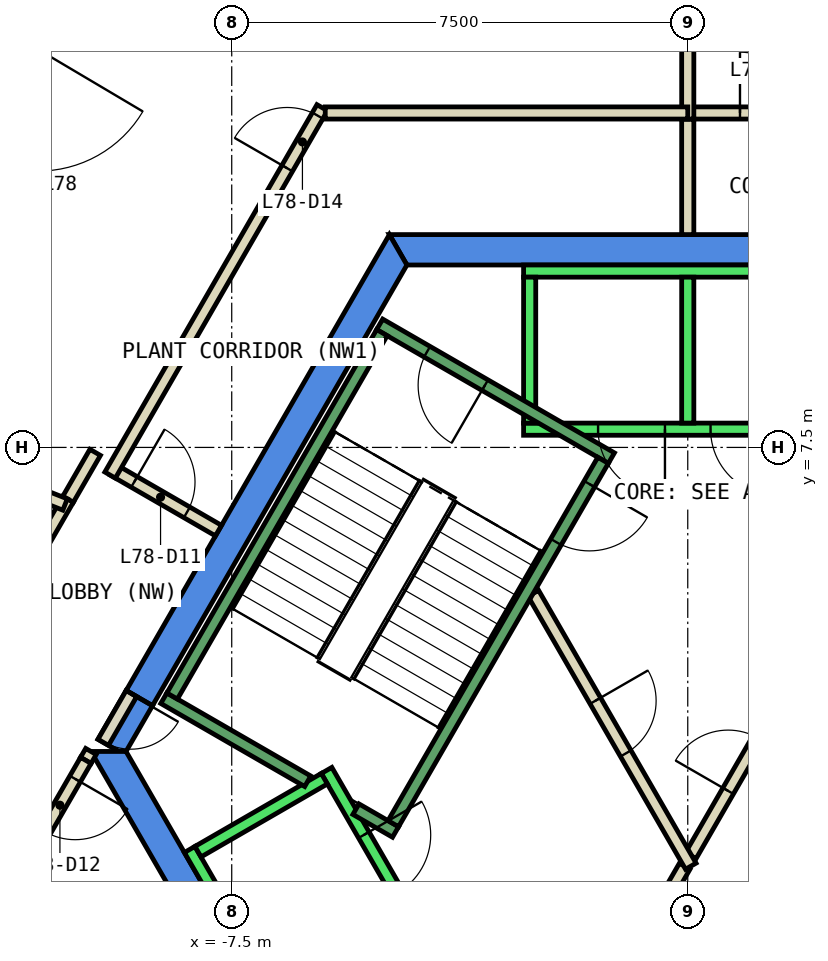
"""IFC4 building model, lengths in metres.
Left out: names, types, materials, properties, quantities, classifications, styles, units other than length and angle.
Written with IfcOpenShell. Run it as: python <this file> out.ifc"""

import sys

from ifc_helpers import new_model, si_unit, direction, frame, frame_2d, origin, place, context, subcontext, project, spatial, polyline, rectangle, outline, extrude, element, fill, save


model = new_model("IFC4")
c1 = context("Model", 3, precision=1e-05, world=origin(), true_north=direction((0.0, 1.0)))
c2 = subcontext(c1, "Body", "Model", "MODEL_VIEW")
j1 = project(units=[si_unit("LENGTHUNIT", "METRE"), si_unit("PLANEANGLEUNIT", "RADIAN")], contexts=[c1])
p1 = place(None, origin())
s1 = spatial("IfcSite", under=j1, at=p1, CompositionType="ELEMENT")
p2 = place(p1, origin())
s2 = spatial("IfcBuilding", under=s1, at=p2, CompositionType="ELEMENT")
p3 = place(p2, frame((0.0, 0.0, 331.4)))
s3 = spatial("IfcBuildingStorey", under=s2, at=p3, CompositionType="ELEMENT", Elevation=331.4)
p4 = place(p3, frame((0.0, 0.0, -0.45)))
e1 = element("IfcWall", 1, at=p4, inside=s3, PredefinedType="SHEAR", context=c2, shape_type="SweptSolid", body=[
    extrude(outline(polyline([(4.907, 11.0), (-4.907, 11.0), (-4.619, 10.5), (4.619, 10.5), (4.907, 11.0)])), origin(), (0.0, 0.0, 1.0), 4.6),
])
p5 = place(p3, frame((0.0, 0.0, -0.45)))
e2 = element("IfcWall", 2, at=p5, inside=s3, PredefinedType="SHEAR", context=c2, shape_type="SweptSolid", body=[
    extrude(outline(polyline([(-9.236, 3.502), (-8.803, 3.253), (-4.619, 10.5), (-4.907, 11.0), (-9.236, 3.502)])), origin(), (0.0, 0.0, 1.0), 4.6),
])
p6 = place(p3, frame((0.0, 0.0, 3.6)))
e3 = element("IfcWall", 3, at=p6, inside=s3, PredefinedType="SHEAR", context=c2, shape_type="SweptSolid", body=[
    extrude(outline(polyline([(-9.7, 2.7), (-9.354, 2.5), (-9.238, 2.5), (-8.803, 3.253), (-9.236, 3.502), (-9.7, 2.7)])), origin(), (0.0, 0.0, 1.0), 0.55),
])
p7 = place(p3, frame((0.0, 0.0, -0.45)))
e4 = element("IfcWall", 4, at=p7, inside=s3, PredefinedType="SHEAR", context=c2, shape_type="SweptSolid", body=[
    extrude(outline(polyline([(-9.815, 2.5), (-4.907, -6.0), (-4.619, -5.5), (-9.238, 2.5), (-9.815, 2.5)])), origin(), (0.0, 0.0, 1.0), 4.6),
])
p8 = place(p3, frame((-10.287, 14.711, 0.0), z_axis=(0.0, 0.0, 1.0), x_axis=(-0.509697735304, -0.86035354281, 0.0)))
e5 = element("IfcWall", 5, at=p8, inside=s3, PredefinedType="STANDARD", context=c2, shape_type="SweptSolid", body=[
    extrude(rectangle(XDim=7.098, YDim=0.3, at=frame_2d((3.549, 0.0))), origin(), (0.0, 0.0, 1.0), 4.15),
])
p9 = place(p8, frame((0.775, 0.0, 0.0)))
e6 = element("IfcOpeningElement", 6, at=p9, cuts=e5, PredefinedType="OPENING", context=c2, shape_type="SweptSolid", body=[
    extrude(rectangle(XDim=2.0, YDim=2.4, at=frame_2d((1.0, 1.2))), frame((0.0, 0.16, 0.0), z_axis=(0.0, -1.0, 0.0), x_axis=(1.0, 0.0, 0.0)), (0.0, 0.0, 1.0), 0.32),
])
p10 = place(p8, frame((4.124, 0.0, 0.9)))
e7 = element("IfcOpeningElement", 7, at=p10, cuts=e5, PredefinedType="OPENING", context=c2, shape_type="SweptSolid", body=[
    extrude(rectangle(XDim=2.4, YDim=3.0, at=frame_2d((1.2, 1.5))), frame((0.0, 0.16, 0.0), z_axis=(0.0, -1.0, 0.0), x_axis=(1.0, 0.0, 0.0)), (0.0, 0.0, 1.0), 0.32),
])
p11 = place(p3, frame((-0.982, -1.0, 0.0), z_axis=(0.0, 0.0, 1.0), x_axis=(0.50024047865, 0.865886518847, 0.0)))
e8 = element("IfcWall", 8, at=p11, inside=s3, PredefinedType="PARTITIONING", context=c2, shape_type="SweptSolid", body=[
    extrude(rectangle(XDim=1.863, YDim=0.2, at=frame_2d((0.931, 0.0))), origin(), (0.0, 0.0, 1.0), 4.15),
])
p12 = place(p3, frame((0.05, 0.787, 0.0), z_axis=(0.0, 0.0, 1.0), x_axis=(0.499954076797, 0.866051915934, 0.0)))
e9 = element("IfcWall", 9, at=p12, inside=s3, PredefinedType="PARTITIONING", context=c2, shape_type="SweptSolid", body=[
    extrude(rectangle(XDim=3.558, YDim=0.2, at=frame_2d((1.779, 0.0))), origin(), (0.0, 0.0, 1.0), 4.15),
])
p13 = place(p12, frame((1.229, 0.0, 0.0)))
e10 = element("IfcOpeningElement", 10, at=p13, cuts=e9, PredefinedType="OPENING", context=c2, shape_type="SweptSolid", body=[
    extrude(rectangle(XDim=1.0, YDim=2.1, at=frame_2d((0.5, 1.05))), frame((0.0, 0.11, 0.0), z_axis=(0.0, -1.0, 0.0), x_axis=(1.0, 0.0, 0.0)), (0.0, 0.0, 1.0), 0.22),
])
p14 = place(p3, frame((-2.54, 5.1, 0.0), z_axis=(0.0, 0.0, 1.0), x_axis=(0.499925051871, -0.866068670783, 0.0)))
e11 = element("IfcWall", 11, at=p14, inside=s3, PredefinedType="PARTITIONING", context=c2, shape_type="SweptSolid", body=[
    extrude(rectangle(XDim=5.181, YDim=0.2, at=frame_2d((2.59, 0.0))), origin(), (0.0, 0.0, 1.0), 4.15),
])
p15 = place(p14, frame((2.04, 0.0, 0.0)))
e12 = element("IfcOpeningElement", 12, at=p15, cuts=e11, PredefinedType="OPENING", context=c2, shape_type="SweptSolid", body=[
    extrude(rectangle(XDim=1.0, YDim=2.1, at=frame_2d((0.5, 1.05))), frame((0.0, 0.11, 0.0), z_axis=(0.0, -1.0, 0.0), x_axis=(1.0, 0.0, 0.0)), (0.0, 0.0, 1.0), 0.22),
])
p16 = place(p3, frame((0.0, 13.0, 0.0), z_axis=(0.0, 0.0, 1.0), x_axis=(1.0, 0.0, 0.0)))
e13 = element("IfcWall", 13, at=p16, inside=s3, PredefinedType="PARTITIONING", context=c2, shape_type="SweptSolid", body=[
    extrude(rectangle(XDim=2.838, YDim=0.2, at=frame_2d((1.419, 0.0))), origin(), (0.0, 0.0, 1.0), 4.15),
])
p17 = place(p16, frame((0.859, 0.0, 0.0)))
e14 = element("IfcOpeningElement", 14, at=p17, cuts=e13, PredefinedType="OPENING", context=c2, shape_type="SweptSolid", body=[
    extrude(rectangle(XDim=1.0, YDim=2.1, at=frame_2d((0.5, 1.05))), frame((0.0, 0.11, 0.0), z_axis=(0.0, -1.0, 0.0), x_axis=(1.0, 0.0, 0.0)), (0.0, 0.0, 1.0), 0.22),
])
p18 = place(p3, frame((0.0, 11.0, 0.0), z_axis=(0.0, 0.0, 1.0), x_axis=(0.0, 1.0, 0.0)))
e15 = element("IfcWall", 15, at=p18, inside=s3, PredefinedType="PARTITIONING", context=c2, shape_type="SweptSolid", body=[
    extrude(rectangle(XDim=1.9, YDim=0.2, at=frame_2d((0.95, 0.0))), origin(), (0.0, 0.0, 1.0), 4.15),
])
p19 = place(p3, frame((0.0, 12.9, 0.0), z_axis=(0.0, 0.0, 1.0), x_axis=(0.0, 1.0, 0.0)))
e16 = element("IfcWall", 16, at=p19, inside=s3, PredefinedType="PARTITIONING", context=c2, shape_type="SweptSolid", body=[
    extrude(rectangle(XDim=10.092, YDim=0.2, at=frame_2d((5.046, 0.0))), origin(), (0.0, 0.0, 1.0), 4.15),
])
p20 = place(p3, frame((-9.45, 7.132, 0.0), z_axis=(0.0, 0.0, 1.0), x_axis=(0.866010750942, -0.50002537861, 0.0)))
e17 = element("IfcWall", 17, at=p20, inside=s3, PredefinedType="PARTITIONING", context=c2, shape_type="SweptSolid", body=[
    extrude(rectangle(XDim=2.0, YDim=0.2, at=frame_2d((1.0, 0.0))), origin(), (0.0, 0.0, 1.0), 4.15),
])
p21 = place(p20, frame((0.4, 0.0, 0.0)))
e18 = element("IfcOpeningElement", 18, at=p21, cuts=e17, PredefinedType="OPENING", context=c2, shape_type="SweptSolid", body=[
    extrude(rectangle(XDim=1.0, YDim=2.1, at=frame_2d((0.5, 1.05))), frame((0.0, 0.11, 0.0), z_axis=(0.0, -1.0, 0.0), x_axis=(1.0, 0.0, 0.0)), (0.0, 0.0, 1.0), 0.22),
])
p22 = place(p3, frame((-9.815, 2.5, 0.0), z_axis=(0.0, 0.0, 1.0), x_axis=(-0.5004692653, -0.865754303766, 0.0)))
e19 = element("IfcWall", 19, at=p22, inside=s3, PredefinedType="PARTITIONING", context=c2, shape_type="SweptSolid", body=[
    extrude(rectangle(XDim=0.17, YDim=0.2, at=frame_2d((0.085, 0.0))), origin(), (0.0, 0.0, 1.0), 2.4),
])
p23 = place(p3, frame((-13.346, 1.183, 0.0), z_axis=(0.0, 0.0, 1.0), x_axis=(0.49998814853, 0.866032246126, 0.0)))
e20 = element("IfcWall", 20, at=p23, inside=s3, PredefinedType="PARTITIONING", context=c2, shape_type="SweptSolid", body=[
    extrude(rectangle(XDim=6.31, YDim=0.2, at=frame_2d((3.155, 0.0))), origin(), (0.0, 0.0, 1.0), 4.15),
])
p24 = place(p23, frame((2.68, 0.0, 0.0)))
e21 = element("IfcOpeningElement", 21, at=p24, cuts=e20, PredefinedType="OPENING", context=c2, shape_type="SweptSolid", body=[
    extrude(rectangle(XDim=1.0, YDim=2.1, at=frame_2d((0.5, 1.05))), frame((0.0, 0.11, 0.0), z_axis=(0.0, -1.0, 0.0), x_axis=(1.0, 0.0, 0.0)), (0.0, 0.0, 1.0), 0.22),
])
p25 = place(p3, frame((-10.191, 6.648, 0.0), z_axis=(0.0, 0.0, 1.0), x_axis=(0.49973828311, 0.866176453382, 0.0)))
e22 = element("IfcWall", 22, at=p25, inside=s3, PredefinedType="PARTITIONING", context=c2, shape_type="SweptSolid", body=[
    extrude(rectangle(XDim=0.89, YDim=0.2, at=frame_2d((0.445, 0.0))), origin(), (0.0, 0.0, 1.0), 4.15),
])
p26 = place(p3, frame((-9.5, 7.045, 0.0), z_axis=(0.0, 0.0, 1.0), x_axis=(0.499966812698, 0.866044563634, 0.0)))
e23 = element("IfcWall", 23, at=p26, inside=s3, PredefinedType="PARTITIONING", context=c2, shape_type="SweptSolid", body=[
    extrude(rectangle(XDim=6.977, YDim=0.2, at=frame_2d((3.488, 0.0))), origin(), (0.0, 0.0, 1.0), 4.15),
])
p27 = place(p26, frame((5.826, 0.0, 0.0)))
e24 = element("IfcOpeningElement", 24, at=p27, cuts=e23, PredefinedType="OPENING", context=c2, shape_type="SweptSolid", body=[
    extrude(rectangle(XDim=1.0, YDim=2.1, at=frame_2d((0.5, 1.05))), frame((0.0, 0.11, 0.0), z_axis=(0.0, -1.0, 0.0), x_axis=(1.0, 0.0, 0.0)), (0.0, 0.0, 1.0), 0.22),
])
p28 = place(p3, frame((-5.962, 13.0, 0.0), z_axis=(0.0, 0.0, 1.0), x_axis=(1.0, 0.0, 0.0)))
e25 = element("IfcWall", 25, at=p28, inside=s3, PredefinedType="PARTITIONING", context=c2, shape_type="SweptSolid", body=[
    extrude(rectangle(XDim=5.962, YDim=0.2, at=frame_2d((2.981, 0.0))), origin(), (0.0, 0.0, 1.0), 4.15),
])
p29 = place(p3, frame((-13.135, 7.709, 0.0), z_axis=(0.0, 0.0, 1.0), x_axis=(0.929543616209, -0.368712171707, 0.0)))
e26 = element("IfcWall", 26, at=p29, inside=s3, PredefinedType="PARTITIONING", context=c2, shape_type="SweptSolid", body=[
    extrude(rectangle(XDim=3.113, YDim=0.2, at=frame_2d((1.557, 0.0))), origin(), (0.0, 0.0, 1.0), 4.15),
])
p30 = place(p3, frame((-9.15, 3.452, 0.0), z_axis=(0.0, 0.0, 1.0), x_axis=(-0.500079945886, -0.865979242085, 0.0)))
e27 = element("IfcWall", 27, at=p30, inside=s3, PredefinedType="PARTITIONING", context=c2, shape_type="SweptSolid", body=[
    extrude(rectangle(XDim=0.926, YDim=0.2, at=frame_2d((0.463, 0.0))), origin(), (0.0, 0.0, 1.0), 2.4),
])
p31 = place(p30, frame((0.017, 0.0, 0.0)))
e28 = element("IfcOpeningElement", 28, at=p31, cuts=e27, PredefinedType="OPENING", context=c2, shape_type="SweptSolid", body=[
    extrude(rectangle(XDim=0.9, YDim=2.1, at=frame_2d((0.45, 1.05))), frame((0.0, 0.11, 0.0), z_axis=(0.0, -1.0, 0.0), x_axis=(1.0, 0.0, 0.0)), (0.0, 0.0, 1.0), 0.22),
])
p32 = place(p3, frame((-9.9, 2.353, 0.0), z_axis=(0.0, 0.0, 1.0), x_axis=(-0.500030632641, -0.866007717299, 0.0)))
e29 = element("IfcWall", 29, at=p32, inside=s3, PredefinedType="PARTITIONING", context=c2, shape_type="SweptSolid", body=[
    extrude(rectangle(XDim=2.24, YDim=0.2, at=frame_2d((1.12, 0.0))), origin(), (0.0, 0.0, 1.0), 4.15),
])
p33 = place(p32, frame((0.351, 0.0, 0.0)))
e30 = element("IfcOpeningElement", 30, at=p33, cuts=e29, PredefinedType="OPENING", context=c2, shape_type="SweptSolid", body=[
    extrude(rectangle(XDim=1.0, YDim=2.1, at=frame_2d((0.5, 1.05))), frame((0.0, 0.11, 0.0), z_axis=(0.0, -1.0, 0.0), x_axis=(1.0, 0.0, 0.0)), (0.0, 0.0, 1.0), 0.22),
])
p34 = place(p3, frame((2.7, 7.8, 0.0), z_axis=(0.0, 0.0, 1.0), x_axis=(-1.0, 0.0, 0.0)))
e31 = element("IfcWall", 31, at=p34, inside=s3, PredefinedType="STANDARD", context=c2, shape_type="SweptSolid", body=[
    extrude(rectangle(XDim=5.4, YDim=0.2, at=frame_2d((2.7, 0.0))), origin(), (0.0, 0.0, 1.0), 4.15),
])
p35 = place(p34, frame((1.225, 0.0, 0.0)))
e32 = element("IfcOpeningElement", 32, at=p35, cuts=e31, PredefinedType="OPENING", context=c2, shape_type="SweptSolid", body=[
    extrude(rectangle(XDim=1.1, YDim=2.1, at=frame_2d((0.55, 1.05))), frame((0.0, 0.11, 0.0), z_axis=(0.0, -1.0, 0.0), x_axis=(1.0, 0.0, 0.0)), (0.0, 0.0, 1.0), 0.22),
])
p36 = place(p34, frame((3.075, 0.0, 0.0)))
e33 = element("IfcOpeningElement", 33, at=p36, cuts=e31, PredefinedType="OPENING", context=c2, shape_type="SweptSolid", body=[
    extrude(rectangle(XDim=1.1, YDim=2.1, at=frame_2d((0.55, 1.05))), frame((0.0, 0.11, 0.0), z_axis=(0.0, -1.0, 0.0), x_axis=(1.0, 0.0, 0.0)), (0.0, 0.0, 1.0), 0.22),
])
p37 = place(p3, frame((2.7, 10.4, 0.0), z_axis=(0.0, 0.0, 1.0), x_axis=(-1.0, 0.0, 0.0)))
e34 = element("IfcWall", 34, at=p37, inside=s3, PredefinedType="STANDARD", context=c2, shape_type="SweptSolid", body=[
    extrude(rectangle(XDim=5.4, YDim=0.2, at=frame_2d((2.7, 0.0))), origin(), (0.0, 0.0, 1.0), 4.15),
])
for number, where, z_axis, x_axis in (
    (35, (0.0, 7.9, 0.0), (0.0, 0.0, 1.0), (0.0, 1.0, 0.0)),
    (36, (-2.6, 7.9, 0.0), (0.0, 0.0, 1.0), (0.0, 1.0, 0.0)),
):
    element("IfcWall", number, at=place(p3, frame(where, z_axis=z_axis, x_axis=x_axis)), inside=s3, PredefinedType="STANDARD", context=c2, shape_type="SweptSolid", body=[
        extrude(rectangle(XDim=2.4, YDim=0.2, at=frame_2d((1.2, 0.0))), origin(), (0.0, 0.0, 1.0), 4.15),
    ])
p38 = place(p3, frame((-5.94, 2.188, 0.0), z_axis=(0.0, 0.0, 1.0), x_axis=(0.500034260056, -0.866005622828, 0.0)))
e37 = element("IfcWall", 37, at=p38, inside=s3, PredefinedType="STANDARD", context=c2, shape_type="SweptSolid", body=[
    extrude(rectangle(XDim=5.399, YDim=0.2, at=frame_2d((2.7, 0.0))), origin(), (0.0, 0.0, 1.0), 4.15),
])
p39 = place(p38, frame((3.075, 0.0, 0.0)))
e38 = element("IfcOpeningElement", 38, at=p39, cuts=e37, PredefinedType="OPENING", context=c2, shape_type="SweptSolid", body=[
    extrude(rectangle(XDim=1.1, YDim=2.1, at=frame_2d((0.55, 1.05))), frame((0.0, 0.11, 0.0), z_axis=(0.0, -1.0, 0.0), x_axis=(1.0, 0.0, 0.0)), (0.0, 0.0, 1.0), 0.22),
])
p40 = place(p38, frame((1.225, 0.0, 0.0)))
e39 = element("IfcOpeningElement", 39, at=p40, cuts=e37, PredefinedType="OPENING", context=c2, shape_type="SweptSolid", body=[
    extrude(rectangle(XDim=1.1, YDim=2.1, at=frame_2d((0.55, 1.05))), frame((0.0, 0.11, 0.0), z_axis=(0.0, -1.0, 0.0), x_axis=(1.0, 0.0, 0.0)), (0.0, 0.0, 1.0), 0.22),
])
p41 = place(p3, frame((-8.192, 0.888, 0.0), z_axis=(0.0, 0.0, 1.0), x_axis=(0.500034260056, -0.866005622828, 0.0)))
e40 = element("IfcWall", 40, at=p41, inside=s3, PredefinedType="STANDARD", context=c2, shape_type="SweptSolid", body=[
    extrude(rectangle(XDim=5.399, YDim=0.2, at=frame_2d((2.7, 0.0))), origin(), (0.0, 0.0, 1.0), 4.15),
])
p42 = place(p3, frame((-5.977, 2.052, 0.0), z_axis=(0.0, 0.0, 1.0), x_axis=(-0.865973769406, -0.500089422704, 0.0)))
e41 = element("IfcWall", 41, at=p42, inside=s3, PredefinedType="STANDARD", context=c2, shape_type="SweptSolid", body=[
    extrude(rectangle(XDim=2.399, YDim=0.2, at=frame_2d((1.2, 0.0))), origin(), (0.0, 0.0, 1.0), 4.15),
])
p43 = place(p3, frame((-1.256, 7.324, 0.0), z_axis=(0.0, 0.0, 1.0), x_axis=(-0.866046073146, 0.499964197906, 0.0)))
e42 = element("IfcWall", 42, at=p43, inside=s3, PredefinedType="STANDARD", context=c2, shape_type="SweptSolid", body=[
    extrude(rectangle(XDim=4.4, YDim=0.2, at=frame_2d((2.2, 0.0))), origin(), (0.0, 0.0, 1.0), 4.15),
])
p44 = place(p43, frame((2.4, 0.0, 0.0)))
e43 = element("IfcOpeningElement", 43, at=p44, cuts=e42, PredefinedType="OPENING", context=c2, shape_type="SweptSolid", body=[
    extrude(rectangle(XDim=1.1, YDim=2.2, at=frame_2d((0.55, 1.1))), frame((0.0, 0.11, 0.0), z_axis=(0.0, -1.0, 0.0), x_axis=(1.0, 0.0, 0.0)), (0.0, 0.0, 1.0), 0.22),
])
p45 = place(p3, frame((-6.25, 2.01, 0.0), z_axis=(0.0, 0.0, 1.0), x_axis=(-0.86611865017, 0.499838457731, 0.0)))
e44 = element("IfcWall", 44, at=p45, inside=s3, PredefinedType="STANDARD", context=c2, shape_type="SweptSolid", body=[
    extrude(rectangle(XDim=2.733, YDim=0.2, at=frame_2d((1.366, 0.0))), origin(), (0.0, 0.0, 1.0), 4.15),
])
p46 = place(p3, frame((-4.806, 1.176, 0.0), z_axis=(0.0, 0.0, 1.0), x_axis=(-0.866558586415, 0.499075361355, 0.0)))
e45 = element("IfcWall", 45, at=p46, inside=s3, PredefinedType="STANDARD", context=c2, shape_type="SweptSolid", body=[
    extrude(rectangle(XDim=0.751, YDim=0.2, at=frame_2d((0.376, 0.0))), origin(), (0.0, 0.0, 1.0), 4.15),
])
p47 = place(p3, frame((-1.393, 7.288, 0.0), z_axis=(0.0, 0.0, 1.0), x_axis=(-0.499963383562, -0.866046543262, 0.0)))
e46 = element("IfcWall", 46, at=p47, inside=s3, PredefinedType="STANDARD", context=c2, shape_type="SweptSolid", body=[
    extrude(rectangle(XDim=6.9, YDim=0.2, at=frame_2d((3.45, 0.0))), origin(), (0.0, 0.0, 1.0), 4.15),
])
p48 = place(p47, frame((0.45, 0.0, 0.0)))
e47 = element("IfcOpeningElement", 47, at=p48, cuts=e46, PredefinedType="OPENING", context=c2, shape_type="SweptSolid", body=[
    extrude(rectangle(XDim=1.1, YDim=2.2, at=frame_2d((0.55, 1.1))), frame((0.0, 0.11, 0.0), z_axis=(0.0, -1.0, 0.0), x_axis=(1.0, 0.0, 0.0)), (0.0, 0.0, 1.0), 0.22),
])
p49 = place(p3, frame((-5.03, 9.388, 0.0), z_axis=(0.0, 0.0, 1.0), x_axis=(-0.499978703459, -0.866037698999, 0.0)))
e48 = element("IfcWall", 48, at=p49, inside=s3, PredefinedType="STANDARD", context=c2, shape_type="SweptSolid", body=[
    extrude(rectangle(XDim=6.9, YDim=0.2, at=frame_2d((3.45, 0.0))), origin(), (0.0, 0.0, 1.0), 4.15),
])
p50 = place(p17, origin())
e49 = element("IfcDoor", 49, at=p50, inside=s3, OperationType="SINGLE_SWING_LEFT", PredefinedType="DOOR", context=c2, shape_type="SweptSolid", body=[
    extrude(rectangle(XDim=1.0, YDim=2.1, at=frame_2d((0.5, 1.05))), frame((0.0, 0.025, 0.0), z_axis=(0.0, -1.0, 0.0), x_axis=(1.0, 0.0, 0.0)), (0.0, 0.0, 1.0), 0.05),
])
fill(e14, e49)
p51 = place(p21, origin())
e50 = element("IfcDoor", 50, at=p51, inside=s3, OperationType="SINGLE_SWING_LEFT", PredefinedType="DOOR", context=c2, shape_type="SweptSolid", body=[
    extrude(rectangle(XDim=1.0, YDim=2.1, at=frame_2d((0.5, 1.05))), frame((0.0, 0.025, 0.0), z_axis=(0.0, -1.0, 0.0), x_axis=(1.0, 0.0, 0.0)), (0.0, 0.0, 1.0), 0.05),
])
fill(e18, e50)
p52 = place(p33, origin())
e51 = element("IfcDoor", 51, at=p52, inside=s3, OperationType="SINGLE_SWING_RIGHT", PredefinedType="DOOR", context=c2, shape_type="SweptSolid", body=[
    extrude(rectangle(XDim=1.0, YDim=2.1, at=frame_2d((0.5, 1.05))), frame((0.0, 0.025, 0.0), z_axis=(0.0, -1.0, 0.0), x_axis=(1.0, 0.0, 0.0)), (0.0, 0.0, 1.0), 0.05),
])
fill(e30, e51)
p53 = place(p27, origin())
e52 = element("IfcDoor", 52, at=p53, inside=s3, OperationType="SINGLE_SWING_RIGHT", PredefinedType="DOOR", context=c2, shape_type="SweptSolid", body=[
    extrude(rectangle(XDim=1.0, YDim=2.1, at=frame_2d((0.5, 1.05))), frame((0.0, 0.025, 0.0), z_axis=(0.0, -1.0, 0.0), x_axis=(1.0, 0.0, 0.0)), (0.0, 0.0, 1.0), 0.05),
])
fill(e24, e52)
p54 = place(p13, origin())
e53 = element("IfcDoor", 53, at=p54, inside=s3, OperationType="SINGLE_SWING_RIGHT", PredefinedType="DOOR", context=c2, shape_type="SweptSolid", body=[
    extrude(rectangle(XDim=1.0, YDim=2.1, at=frame_2d((0.5, 1.05))), frame((0.0, 0.025, 0.0), z_axis=(0.0, -1.0, 0.0), x_axis=(1.0, 0.0, 0.0)), (0.0, 0.0, 1.0), 0.05),
])
fill(e10, e53)
p55 = place(p15, origin())
e54 = element("IfcDoor", 54, at=p55, inside=s3, OperationType="SINGLE_SWING_RIGHT", PredefinedType="DOOR", context=c2, shape_type="SweptSolid", body=[
    extrude(rectangle(XDim=1.0, YDim=2.1, at=frame_2d((0.5, 1.05))), frame((0.0, 0.025, 0.0), z_axis=(0.0, -1.0, 0.0), x_axis=(1.0, 0.0, 0.0)), (0.0, 0.0, 1.0), 0.05),
])
fill(e12, e54)
p56 = place(p31, origin())
e55 = element("IfcDoor", 55, at=p56, inside=s3, OperationType="SINGLE_SWING_LEFT", PredefinedType="DOOR", context=c2, shape_type="SweptSolid", body=[
    extrude(rectangle(XDim=0.9, YDim=2.1, at=frame_2d((0.45, 1.05))), frame((0.0, 0.025, 0.0), z_axis=(0.0, -1.0, 0.0), x_axis=(1.0, 0.0, 0.0)), (0.0, 0.0, 1.0), 0.05),
])
fill(e28, e55)
p57 = place(p35, origin())
e56 = element("IfcDoor", 56, at=p57, inside=s3, OperationType="SLIDING_TO_LEFT", PredefinedType="DOOR", context=c2, shape_type="SweptSolid", body=[
    extrude(rectangle(XDim=1.1, YDim=2.1, at=frame_2d((0.55, 1.05))), frame((0.0, 0.025, 0.0), z_axis=(0.0, -1.0, 0.0), x_axis=(1.0, 0.0, 0.0)), (0.0, 0.0, 1.0), 0.05),
])
fill(e32, e56)
p58 = place(p36, origin())
e57 = element("IfcDoor", 57, at=p58, inside=s3, OperationType="SLIDING_TO_LEFT", PredefinedType="DOOR", context=c2, shape_type="SweptSolid", body=[
    extrude(rectangle(XDim=1.1, YDim=2.1, at=frame_2d((0.55, 1.05))), frame((0.0, 0.025, 0.0), z_axis=(0.0, -1.0, 0.0), x_axis=(1.0, 0.0, 0.0)), (0.0, 0.0, 1.0), 0.05),
])
fill(e33, e57)
p59 = place(p40, origin())
e58 = element("IfcDoor", 58, at=p59, inside=s3, OperationType="SLIDING_TO_LEFT", PredefinedType="DOOR", context=c2, shape_type="SweptSolid", body=[
    extrude(rectangle(XDim=1.1, YDim=2.1, at=frame_2d((0.55, 1.05))), frame((0.0, 0.025, 0.0), z_axis=(0.0, -1.0, 0.0), x_axis=(1.0, 0.0, 0.0)), (0.0, 0.0, 1.0), 0.05),
])
fill(e39, e58)
p60 = place(p48, origin())
e59 = element("IfcDoor", 59, at=p60, inside=s3, OperationType="SINGLE_SWING_LEFT", PredefinedType="DOOR", context=c2, shape_type="SweptSolid", body=[
    extrude(rectangle(XDim=1.1, YDim=2.2, at=frame_2d((0.55, 1.1))), frame((0.0, 0.025, 0.0), z_axis=(0.0, -1.0, 0.0), x_axis=(1.0, 0.0, 0.0)), (0.0, 0.0, 1.0), 0.05),
])
fill(e47, e59)
p61 = place(p44, origin())
e60 = element("IfcDoor", 60, at=p61, inside=s3, OperationType="SINGLE_SWING_LEFT", PredefinedType="DOOR", context=c2, shape_type="SweptSolid", body=[
    extrude(rectangle(XDim=1.1, YDim=2.2, at=frame_2d((0.55, 1.1))), frame((0.0, 0.025, 0.0), z_axis=(0.0, -1.0, 0.0), x_axis=(1.0, 0.0, 0.0)), (0.0, 0.0, 1.0), 0.05),
])
fill(e43, e60)
save(model, sys.argv[1])
